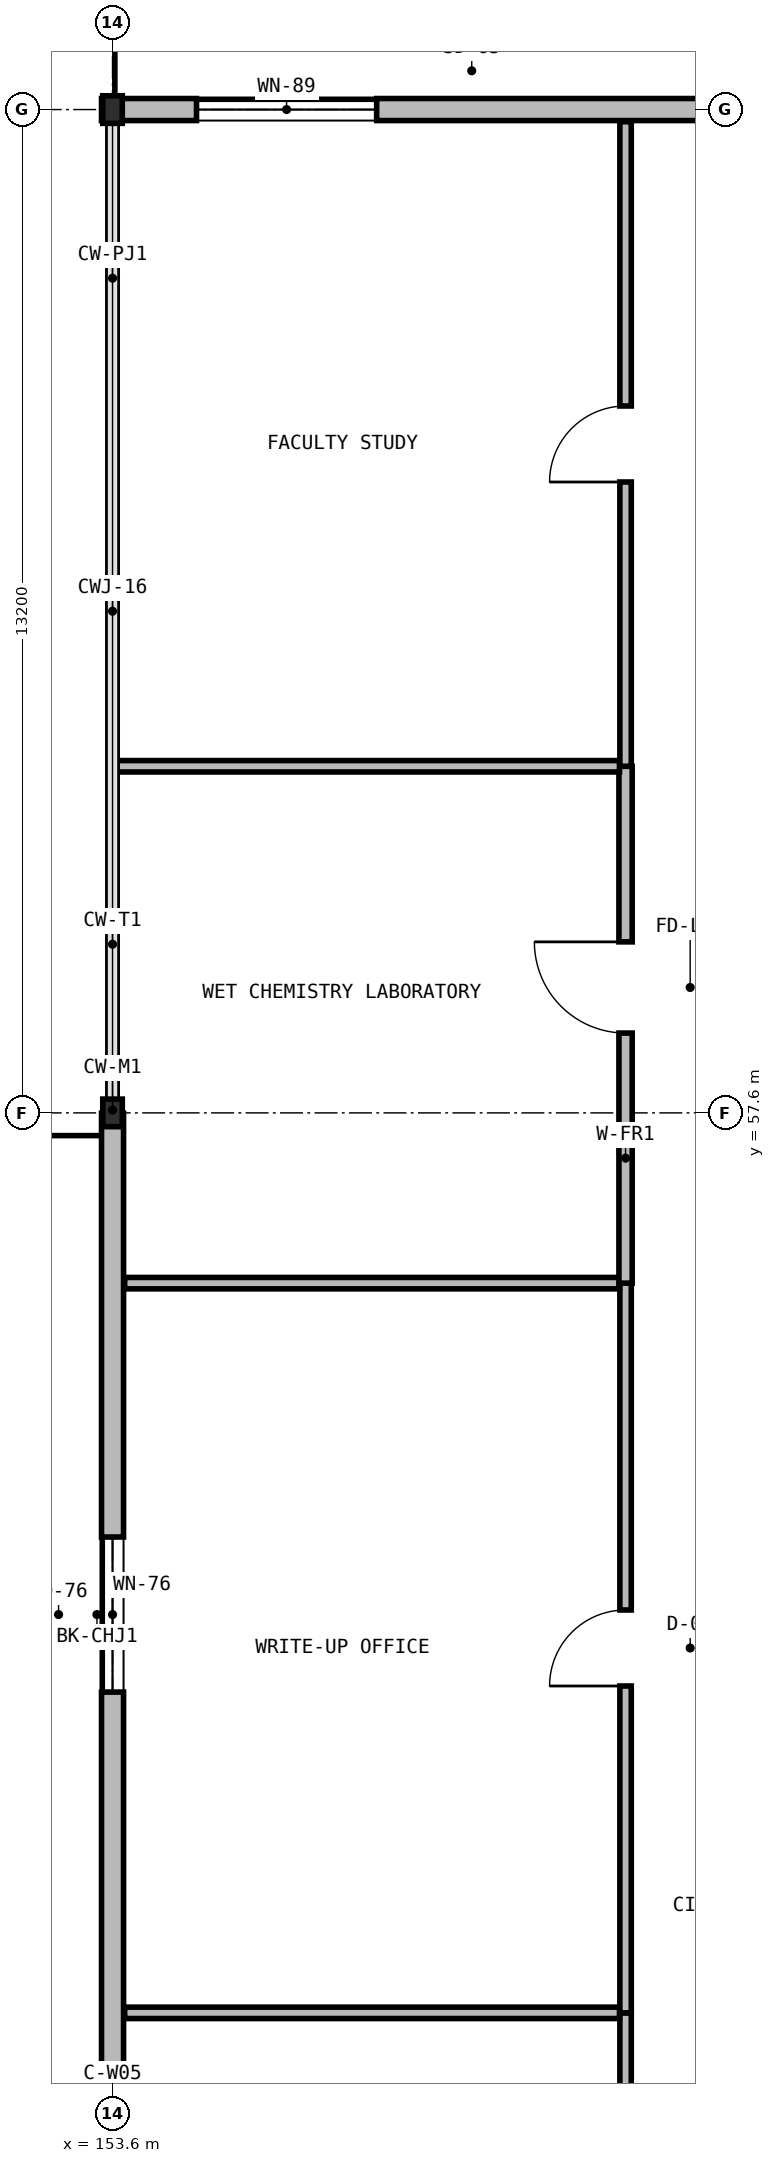
"""IFC4 building model, lengths in metres.
Left out: names, types, materials, properties, quantities, classifications, styles, units other than length and angle.
Written with IfcOpenShell. Run it as: python <this file> out.ifc"""

import sys

from ifc_helpers import new_model, si_unit, direction, frame, frame_2d, origin, origin_2d, place, context, subcontext, project, spatial, rectangle, i_section, extrude, element, fill, save


model = new_model("IFC4")
c1 = context("Model", 3, precision=1e-05, world=origin(), true_north=direction((0.0, 1.0)))
c2 = subcontext(c1, "Body", "Model", "MODEL_VIEW")
j1 = project(units=[si_unit("LENGTHUNIT", "METRE"), si_unit("PLANEANGLEUNIT", "RADIAN")], contexts=[c1])
p1 = place(None, origin())
s1 = spatial("IfcSite", under=j1, at=p1, CompositionType="ELEMENT")
p2 = place(p1, origin())
s2 = spatial("IfcBuilding", under=s1, at=p2, CompositionType="ELEMENT")
p3 = place(p2, frame((0.0, 0.0, 32.55)))
s3 = spatial("IfcBuildingStorey", under=s2, at=p3, CompositionType="ELEMENT", Elevation=32.55)
for number, where, z_axis, x_axis in (
    (1, (153.6, 57.6, 0.0), (0.0, 0.0, 1.0), (1.0, 0.0, 0.0)),
    (2, (153.6, 70.8, 0.0), (0.0, 0.0, 1.0), (1.0, 0.0, 0.0)),
):
    element("IfcColumn", number, at=place(p3, frame(where, z_axis=z_axis, x_axis=x_axis)), inside=s3, PredefinedType="COLUMN", context=c2, shape_type="SweptSolid", body=[
        extrude(i_section(OverallWidth=0.257, OverallDepth=0.363, WebThickness=0.013, FlangeThickness=0.022, at=origin_2d()), origin(), (0.0, 0.0, 1.0), 4.55),
    ])
p4 = place(p3, frame((153.6, 44.404, 0.0), z_axis=(0.0, 0.0, 1.0), x_axis=(0.0, 1.0, 0.0)))
e3 = element("IfcWall", 3, at=p4, inside=s3, PredefinedType="SOLIDWALL", context=c2, shape_type="SweptSolid", body=[
    extrude(rectangle(XDim=13.192, YDim=0.29, at=frame_2d((6.596, 0.0))), origin(), (0.0, 0.0, 1.0), 3.757),
])
p5 = place(p4, frame((5.576, 0.0, 0.95)))
e4 = element("IfcOpeningElement", 4, at=p5, cuts=e3, PredefinedType="OPENING", context=c2, shape_type="SweptSolid", body=[
    extrude(rectangle(XDim=2.04, YDim=1.4, at=frame_2d((1.02, 0.7))), frame((0.0, 0.155, 0.0), z_axis=(0.0, -1.0, 0.0), x_axis=(1.0, 0.0, 0.0)), (0.0, 0.0, 1.0), 0.31),
])
p6 = place(p3, frame((153.455, 70.8, 0.0), z_axis=(0.0, 0.0, 1.0), x_axis=(1.0, 0.0, 0.0)))
e5 = element("IfcWall", 5, at=p6, inside=s3, PredefinedType="SOLIDWALL", context=c2, shape_type="SweptSolid", body=[
    extrude(rectangle(XDim=9.741, YDim=0.29, at=frame_2d((4.871, 0.0))), origin(), (0.0, 0.0, 1.0), 3.763),
])
p7 = place(p6, frame((1.25, 0.0, 0.95)))
e6 = element("IfcOpeningElement", 6, at=p7, cuts=e5, PredefinedType="OPENING", context=c2, shape_type="SweptSolid", body=[
    extrude(rectangle(XDim=2.37, YDim=1.8, at=frame_2d((1.185, 0.9))), frame((0.0, 0.155, 0.0), z_axis=(0.0, -1.0, 0.0), x_axis=(1.0, 0.0, 0.0)), (0.0, 0.0, 1.0), 0.31),
])
p8 = place(p3, frame((160.35, 38.36, 0.0), z_axis=(0.0, 0.0, 1.0), x_axis=(0.0, 1.0, 0.0)))
e7 = element("IfcWall", 7, at=p8, inside=s3, PredefinedType="PARTITIONING", context=c2, shape_type="SweptSolid", body=[
    extrude(rectangle(XDim=7.4, YDim=0.15, at=frame_2d((3.7, 0.0))), origin(), (0.0, 0.0, 1.0), 4.3),
])
p9 = place(p8, frame((3.2, 0.0, 0.0)))
e8 = element("IfcOpeningElement", 8, at=p9, cuts=e7, PredefinedType="OPENING", context=c2, shape_type="SweptSolid", body=[
    extrude(rectangle(XDim=1.0, YDim=2.2, at=frame_2d((0.5, 1.1))), frame((0.0, 0.085, 0.0), z_axis=(0.0, -1.0, 0.0), x_axis=(1.0, 0.0, 0.0)), (0.0, 0.0, 1.0), 0.17),
])
p10 = place(p3, frame((153.76, 45.76, 0.0), z_axis=(0.0, 0.0, 1.0), x_axis=(1.0, 0.0, 0.0)))
e9 = element("IfcWall", 9, at=p10, inside=s3, PredefinedType="PARTITIONING", context=c2, shape_type="SweptSolid", body=[
    extrude(rectangle(XDim=6.51, YDim=0.15, at=frame_2d((3.255, 0.0))), origin(), (0.0, 0.0, 1.0), 4.3),
])
p11 = place(p3, frame((160.35, 45.76, 0.0), z_axis=(0.0, 0.0, 1.0), x_axis=(0.0, 1.0, 0.0)))
e10 = element("IfcWall", 10, at=p11, inside=s3, PredefinedType="PARTITIONING", context=c2, shape_type="SweptSolid", body=[
    extrude(rectangle(XDim=9.6, YDim=0.15, at=frame_2d((4.8, 0.0))), origin(), (0.0, 0.0, 1.0), 4.3),
])
p12 = place(p11, frame((4.3, 0.0, 0.0)))
e11 = element("IfcOpeningElement", 11, at=p12, cuts=e10, PredefinedType="OPENING", context=c2, shape_type="SweptSolid", body=[
    extrude(rectangle(XDim=1.0, YDim=2.2, at=frame_2d((0.5, 1.1))), frame((0.0, 0.085, 0.0), z_axis=(0.0, -1.0, 0.0), x_axis=(1.0, 0.0, 0.0)), (0.0, 0.0, 1.0), 0.17),
])
p13 = place(p3, frame((153.76, 55.36, 0.0), z_axis=(0.0, 0.0, 1.0), x_axis=(1.0, 0.0, 0.0)))
e12 = element("IfcWall", 12, at=p13, inside=s3, PredefinedType="PARTITIONING", context=c2, shape_type="SweptSolid", body=[
    extrude(rectangle(XDim=6.51, YDim=0.15, at=frame_2d((3.255, 0.0))), origin(), (0.0, 0.0, 1.0), 4.3),
])
p14 = place(p3, frame((160.35, 55.36, 0.0), z_axis=(0.0, 0.0, 1.0), x_axis=(0.0, 1.0, 0.0)))
e13 = element("IfcWall", 13, at=p14, inside=s3, PredefinedType="PARTITIONING", context=c2, shape_type="SweptSolid", body=[
    extrude(rectangle(XDim=6.8, YDim=0.175, at=frame_2d((3.4, 0.0))), origin(), (0.0, 0.0, 1.0), 4.3),
])
p15 = place(p14, frame((3.29, 0.0, 0.0)))
e14 = element("IfcOpeningElement", 14, at=p15, cuts=e13, PredefinedType="OPENING", context=c2, shape_type="SweptSolid", body=[
    extrude(rectangle(XDim=1.2, YDim=2.2, at=frame_2d((0.6, 1.1))), frame((0.0, 0.097, 0.0), z_axis=(0.0, -1.0, 0.0), x_axis=(1.0, 0.0, 0.0)), (0.0, 0.0, 1.0), 0.195),
])
p16 = place(p3, frame((153.66, 62.16, 0.0), z_axis=(0.0, 0.0, 1.0), x_axis=(1.0, 0.0, 0.0)))
e15 = element("IfcWall", 15, at=p16, inside=s3, PredefinedType="PARTITIONING", context=c2, shape_type="SweptSolid", body=[
    extrude(rectangle(XDim=6.61, YDim=0.15, at=frame_2d((3.305, 0.0))), origin(), (0.0, 0.0, 1.0), 4.3),
])
p17 = place(p3, frame((160.35, 62.16, 0.0), z_axis=(0.0, 0.0, 1.0), x_axis=(0.0, 1.0, 0.0)))
e16 = element("IfcWall", 16, at=p17, inside=s3, PredefinedType="PARTITIONING", context=c2, shape_type="SweptSolid", body=[
    extrude(rectangle(XDim=8.48, YDim=0.15, at=frame_2d((4.24, 0.0))), origin(), (0.0, 0.0, 1.0), 4.3),
])
p18 = place(p17, frame((3.74, 0.0, 0.0)))
e17 = element("IfcOpeningElement", 17, at=p18, cuts=e16, PredefinedType="OPENING", context=c2, shape_type="SweptSolid", body=[
    extrude(rectangle(XDim=1.0, YDim=2.2, at=frame_2d((0.5, 1.1))), frame((0.0, 0.085, 0.0), z_axis=(0.0, -1.0, 0.0), x_axis=(1.0, 0.0, 0.0)), (0.0, 0.0, 1.0), 0.17),
])
p19 = place(p5, origin())
e18 = element("IfcWindow", 18, at=p19, inside=s3, PartitioningType="SINGLE_PANEL", PredefinedType="WINDOW", context=c2, shape_type="SweptSolid", body=[
    extrude(rectangle(XDim=2.04, YDim=1.4, at=frame_2d((1.02, 0.7))), frame((0.0, 0.03, 0.0), z_axis=(0.0, -1.0, 0.0), x_axis=(1.0, 0.0, 0.0)), (0.0, 0.0, 1.0), 0.06),
])
fill(e4, e18)
p20 = place(p7, origin())
e19 = element("IfcWindow", 19, at=p20, inside=s3, PartitioningType="SINGLE_PANEL", PredefinedType="WINDOW", context=c2, shape_type="SweptSolid", body=[
    extrude(rectangle(XDim=2.37, YDim=1.8, at=frame_2d((1.185, 0.9))), frame((0.0, 0.03, 0.0), z_axis=(0.0, -1.0, 0.0), x_axis=(1.0, 0.0, 0.0)), (0.0, 0.0, 1.0), 0.06),
])
fill(e6, e19)
p21 = place(p12, origin())
e20 = element("IfcDoor", 20, at=p21, inside=s3, OperationType="SINGLE_SWING_LEFT", PredefinedType="DOOR", context=c2, shape_type="SweptSolid", body=[
    extrude(rectangle(XDim=1.0, YDim=2.2, at=frame_2d((0.5, 1.1))), frame((0.0, 0.025, 0.0), z_axis=(0.0, -1.0, 0.0), x_axis=(1.0, 0.0, 0.0)), (0.0, 0.0, 1.0), 0.05),
])
fill(e11, e20)
p22 = place(p15, origin())
e21 = element("IfcDoor", 21, at=p22, inside=s3, OperationType="SINGLE_SWING_RIGHT", PredefinedType="DOOR", context=c2, shape_type="SweptSolid", body=[
    extrude(rectangle(XDim=1.2, YDim=2.2, at=frame_2d((0.6, 1.1))), frame((0.0, 0.025, 0.0), z_axis=(0.0, -1.0, 0.0), x_axis=(1.0, 0.0, 0.0)), (0.0, 0.0, 1.0), 0.05),
])
fill(e14, e21)
p23 = place(p18, origin())
e22 = element("IfcDoor", 22, at=p23, inside=s3, OperationType="SINGLE_SWING_LEFT", PredefinedType="DOOR", context=c2, shape_type="SweptSolid", body=[
    extrude(rectangle(XDim=1.0, YDim=2.2, at=frame_2d((0.5, 1.1))), frame((0.0, 0.025, 0.0), z_axis=(0.0, -1.0, 0.0), x_axis=(1.0, 0.0, 0.0)), (0.0, 0.0, 1.0), 0.05),
])
fill(e17, e22)
save(model, sys.argv[1])
